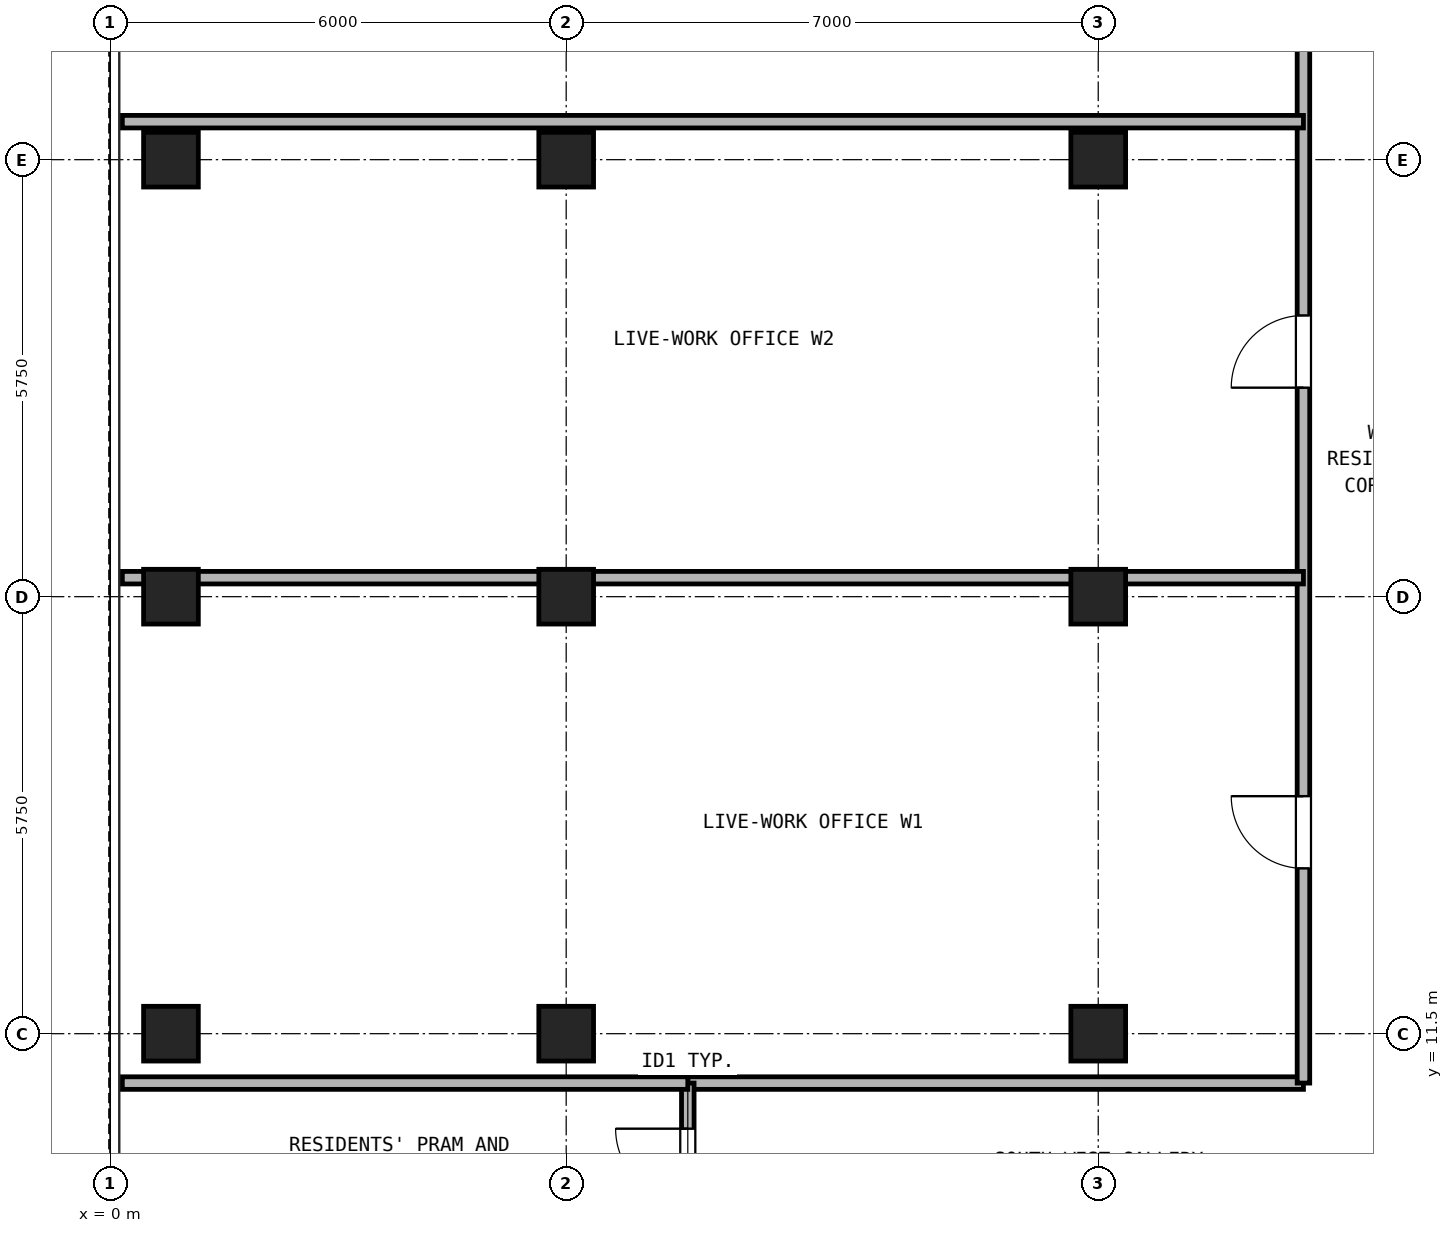
"""IFC4 building model, lengths in metres.
Left out: names, types, materials, properties, quantities, classifications, styles, units other than length and angle.
Written with IfcOpenShell. Run it as: python <this file> out.ifc"""

import sys

from ifc_helpers import new_model, si_unit, direction, frame, frame_2d, origin, origin_2d, place, context, subcontext, project, spatial, rectangle, hollow_rectangle, extrude, source, transform, mapped, element, fill, save


model = new_model("IFC4")
c1 = context("Model", 3, precision=1e-05, world=origin(), true_north=direction((0.0, 1.0)))
c2 = subcontext(c1, "Body", "Model", "MODEL_VIEW")
j1 = project(units=[si_unit("LENGTHUNIT", "METRE"), si_unit("PLANEANGLEUNIT", "RADIAN")], contexts=[c1])
p1 = place(None, origin())
s1 = spatial("IfcSite", under=j1, at=p1, CompositionType="ELEMENT")
p2 = place(p1, origin())
s2 = spatial("IfcBuilding", under=s1, at=p2, CompositionType="ELEMENT")
p3 = place(p2, frame((0.0, 0.0, 199.6)))
s3 = spatial("IfcBuildingStorey", under=s2, at=p3, CompositionType="ELEMENT", Elevation=199.6)
m1 = source(origin(), c2, "Body", "SweptSolid", [
    extrude(hollow_rectangle(XDim=0.72, YDim=0.72, WallThickness=0.04, at=origin_2d()), origin(), (0.0, 0.0, 1.0), 2.95),
])
for number, where, z_axis, x_axis in (
    (1, (0.8, 11.5, 0.0), (0.0, 0.0, 1.0), (1.0, 0.0, 0.0)),
    (2, (0.8, 17.25, 0.0), (0.0, 0.0, 1.0), (1.0, 0.0, 0.0)),
    (3, (0.8, 23.0, 0.0), (0.0, 0.0, 1.0), (1.0, 0.0, 0.0)),
    (4, (6.0, 11.5, 0.0), (0.0, 0.0, 1.0), (1.0, 0.0, 0.0)),
    (5, (6.0, 17.25, 0.0), (0.0, 0.0, 1.0), (1.0, 0.0, 0.0)),
    (6, (6.0, 23.0, 0.0), (0.0, 0.0, 1.0), (1.0, 0.0, 0.0)),
    (7, (13.0, 11.5, 0.0), (0.0, 0.0, 1.0), (1.0, 0.0, 0.0)),
    (8, (13.0, 17.25, 0.0), (0.0, 0.0, 1.0), (1.0, 0.0, 0.0)),
    (9, (13.0, 23.0, 0.0), (0.0, 0.0, 1.0), (1.0, 0.0, 0.0)),
):
    element("IfcColumn", number, at=place(p3, frame(where, z_axis=z_axis, x_axis=x_axis)), inside=s3, PredefinedType="COLUMN", context=c2, shape_type="MappedRepresentation", body=[
        mapped(m1, transform((0.0, 0.0, 0.0), x_axis=(1.0, 0.0, 0.0), y_axis=(0.0, 1.0, 0.0), z_axis=(0.0, 0.0, 1.0), scale=1.0)),
    ])
p4 = place(p3, frame((7.6, 10.85, 0.0), z_axis=(0.0, 0.0, 1.0), x_axis=(1.0, 0.0, 0.0)))
e10 = element("IfcWall", 10, at=p4, inside=s3, PredefinedType="PARTITIONING", context=c2, shape_type="SweptSolid", body=[
    extrude(rectangle(XDim=8.1, YDim=0.165, at=frame_2d((4.05, 0.0))), origin(), (0.0, 0.0, 1.0), 2.95),
])
p5 = place(p3, frame((7.6, 8.85, 0.0), z_axis=(0.0, 0.0, 1.0), x_axis=(0.0, 1.0, 0.0)))
e11 = element("IfcWall", 11, at=p5, inside=s3, PredefinedType="PARTITIONING", context=c2, shape_type="SweptSolid", body=[
    extrude(rectangle(XDim=2.0, YDim=0.165, at=frame_2d((1.0, 0.0))), origin(), (0.0, 0.0, 1.0), 2.95),
])
p6 = place(p5, frame((0.45, 0.0, 0.0)))
e12 = element("IfcOpeningElement", 12, at=p6, cuts=e11, PredefinedType="OPENING", context=c2, shape_type="SweptSolid", body=[
    extrude(rectangle(XDim=0.95, YDim=2.15, at=frame_2d((0.475, 1.075))), frame((0.0, 0.093, 0.0), z_axis=(0.0, -1.0, 0.0), x_axis=(1.0, 0.0, 0.0)), (0.0, 0.0, 1.0), 0.185),
])
p7 = place(p3, frame((15.7, 10.85, 0.0), z_axis=(0.0, 0.0, 1.0), x_axis=(0.0, 1.0, 0.0)))
e13 = element("IfcWall", 13, at=p7, inside=s3, PredefinedType="PARTITIONING", context=c2, shape_type="SweptSolid", body=[
    extrude(rectangle(XDim=24.29, YDim=0.165, at=frame_2d((12.145, 0.0))), origin(), (0.0, 0.0, 1.0), 2.95),
])
p8 = place(p7, frame((2.825, 0.0, 0.0)))
e14 = element("IfcOpeningElement", 14, at=p8, cuts=e13, PredefinedType="OPENING", context=c2, shape_type="SweptSolid", body=[
    extrude(rectangle(XDim=0.95, YDim=2.15, at=frame_2d((0.475, 1.075))), frame((0.0, 0.093, 0.0), z_axis=(0.0, -1.0, 0.0), x_axis=(1.0, 0.0, 0.0)), (0.0, 0.0, 1.0), 0.185),
])
p9 = place(p7, frame((9.15, 0.0, 0.0)))
e15 = element("IfcOpeningElement", 15, at=p9, cuts=e13, PredefinedType="OPENING", context=c2, shape_type="SweptSolid", body=[
    extrude(rectangle(XDim=0.95, YDim=2.15, at=frame_2d((0.475, 1.075))), frame((0.0, 0.093, 0.0), z_axis=(0.0, -1.0, 0.0), x_axis=(1.0, 0.0, 0.0)), (0.0, 0.0, 1.0), 0.185),
])
p10 = place(p7, frame((15.15, 0.0, 0.0)))
e16 = element("IfcOpeningElement", 16, at=p10, cuts=e13, PredefinedType="OPENING", context=c2, shape_type="SweptSolid", body=[
    extrude(rectangle(XDim=0.95, YDim=2.15, at=frame_2d((0.475, 1.075))), frame((0.0, 0.093, 0.0), z_axis=(0.0, -1.0, 0.0), x_axis=(1.0, 0.0, 0.0)), (0.0, 0.0, 1.0), 0.185),
])
p11 = place(p7, frame((20.97, 0.0, 0.0)))
e17 = element("IfcOpeningElement", 17, at=p11, cuts=e13, PredefinedType="OPENING", context=c2, shape_type="SweptSolid", body=[
    extrude(rectangle(XDim=0.95, YDim=2.15, at=frame_2d((0.475, 1.075))), frame((0.0, 0.093, 0.0), z_axis=(0.0, -1.0, 0.0), x_axis=(1.0, 0.0, 0.0)), (0.0, 0.0, 1.0), 0.185),
])
p12 = place(p3, frame((0.16, 10.85, 0.0), z_axis=(0.0, 0.0, 1.0), x_axis=(1.0, 0.0, 0.0)))
e18 = element("IfcWall", 18, at=p12, inside=s3, PredefinedType="PARTITIONING", context=c2, shape_type="SweptSolid", body=[
    extrude(rectangle(XDim=7.44, YDim=0.165, at=frame_2d((3.72, 0.0))), origin(), (0.0, 0.0, 1.0), 2.95),
])
p13 = place(p3, frame((0.16, 17.5, 0.0), z_axis=(0.0, 0.0, 1.0), x_axis=(1.0, 0.0, 0.0)))
e19 = element("IfcWall", 19, at=p13, inside=s3, PredefinedType="PARTITIONING", context=c2, shape_type="SweptSolid", body=[
    extrude(rectangle(XDim=15.54, YDim=0.165, at=frame_2d((7.77, 0.0))), origin(), (0.0, 0.0, 1.0), 2.323),
])
p14 = place(p3, frame((0.16, 23.5, 0.0), z_axis=(0.0, 0.0, 1.0), x_axis=(1.0, 0.0, 0.0)))
e20 = element("IfcWall", 20, at=p14, inside=s3, PredefinedType="PARTITIONING", context=c2, shape_type="SweptSolid", body=[
    extrude(rectangle(XDim=15.54, YDim=0.165, at=frame_2d((7.77, 0.0))), origin(), (0.0, 0.0, 1.0), 2.95),
])
p15 = place(p6, frame((0.95, 0.0, 0.0), z_axis=(0.0, 0.0, 1.0), x_axis=(-1.0, 0.0, 0.0)))
e21 = element("IfcDoor", 21, at=p15, inside=s3, OperationType="SINGLE_SWING_RIGHT", PredefinedType="DOOR", context=c2, shape_type="SweptSolid", body=[
    extrude(rectangle(XDim=0.95, YDim=2.15, at=frame_2d((0.475, 1.075))), frame((0.0, 0.025, 0.0), z_axis=(0.0, -1.0, 0.0), x_axis=(1.0, 0.0, 0.0)), (0.0, 0.0, 1.0), 0.05),
])
fill(e12, e21)
p16 = place(p8, frame((0.95, 0.0, 0.0), z_axis=(0.0, 0.0, 1.0), x_axis=(-1.0, 0.0, 0.0)))
e22 = element("IfcDoor", 22, at=p16, inside=s3, OperationType="SINGLE_SWING_RIGHT", PredefinedType="DOOR", context=c2, shape_type="SweptSolid", body=[
    extrude(rectangle(XDim=0.95, YDim=2.15, at=frame_2d((0.475, 1.075))), frame((0.0, 0.025, 0.0), z_axis=(0.0, -1.0, 0.0), x_axis=(1.0, 0.0, 0.0)), (0.0, 0.0, 1.0), 0.05),
])
fill(e14, e22)
p17 = place(p9, frame((0.95, 0.0, 0.0), z_axis=(0.0, 0.0, 1.0), x_axis=(-1.0, 0.0, 0.0)))
e23 = element("IfcDoor", 23, at=p17, inside=s3, OperationType="SINGLE_SWING_LEFT", PredefinedType="DOOR", context=c2, shape_type="SweptSolid", body=[
    extrude(rectangle(XDim=0.95, YDim=2.15, at=frame_2d((0.475, 1.075))), frame((0.0, 0.025, 0.0), z_axis=(0.0, -1.0, 0.0), x_axis=(1.0, 0.0, 0.0)), (0.0, 0.0, 1.0), 0.05),
])
fill(e15, e23)
save(model, sys.argv[1])
